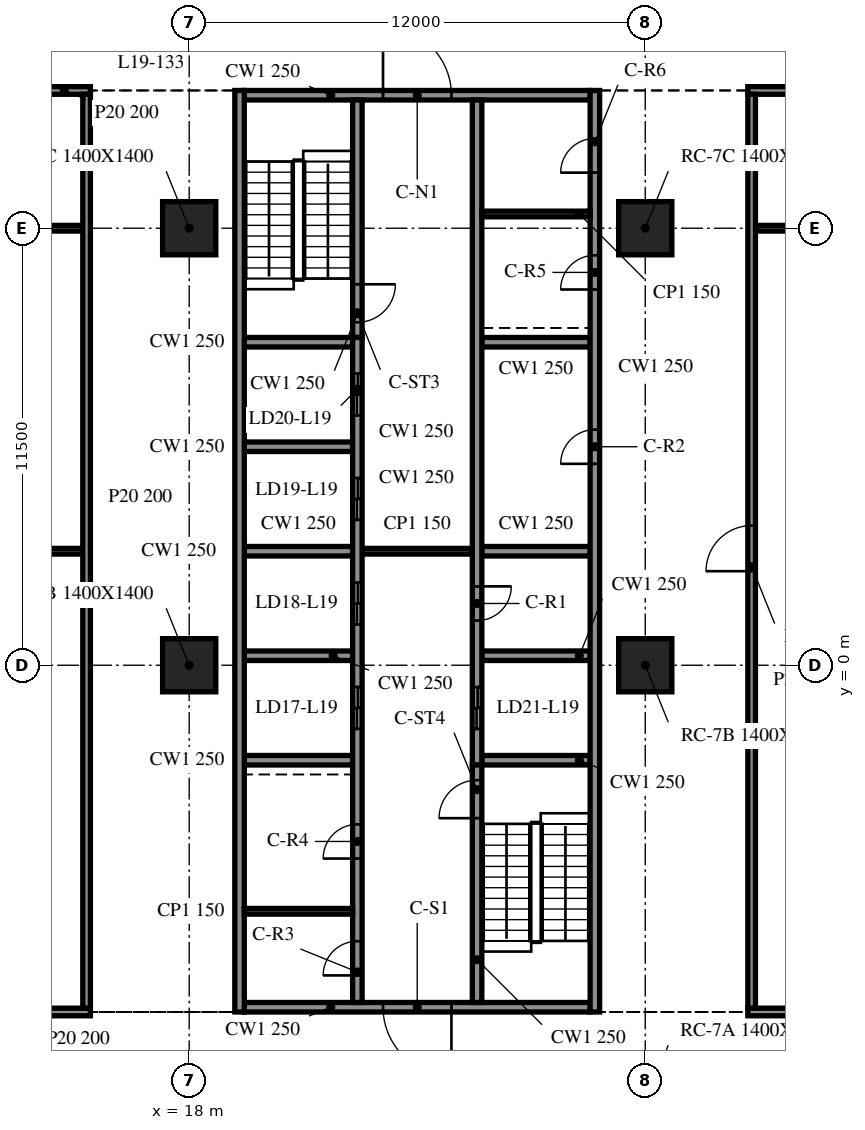
"""IFC4 building model, lengths in metres.
Left out: names, types, materials, properties, quantities, classifications, styles, units other than length and angle.
Written with IfcOpenShell. Run it as: python <this file> out.ifc"""

import sys

from ifc_helpers import new_model, si_unit, direction, frame, frame_2d, origin, origin_2d, place, context, subcontext, project, spatial, rectangle, extrude, element, fill, save


model = new_model("IFC4")
c1 = context("Model", 3, precision=1e-05, world=origin(), true_north=direction((0.0, 1.0)))
c2 = subcontext(c1, "Body", "Model", "MODEL_VIEW")
j1 = project(units=[si_unit("LENGTHUNIT", "METRE"), si_unit("PLANEANGLEUNIT", "RADIAN")], contexts=[c1])
p1 = place(None, origin())
s1 = spatial("IfcSite", under=j1, at=p1, CompositionType="ELEMENT")
p2 = place(p1, origin())
s2 = spatial("IfcBuilding", under=s1, at=p2, CompositionType="ELEMENT")
p3 = place(p2, frame((0.0, 0.0, 84.8)))
s3 = spatial("IfcBuildingStorey", under=s2, at=p3, CompositionType="ELEMENT", Elevation=84.8)
for number, where, z_axis, x_axis in (
    (1, (18.0, 0.0, -0.34), (0.0, 0.0, 1.0), (1.0, 0.0, 0.0)),
    (2, (18.0, 11.5, -0.34), (0.0, 0.0, 1.0), (1.0, 0.0, 0.0)),
    (3, (30.0, 0.0, -0.34), (0.0, 0.0, 1.0), (1.0, 0.0, 0.0)),
    (4, (30.0, 11.5, -0.34), (0.0, 0.0, 1.0), (1.0, 0.0, 0.0)),
):
    element("IfcColumn", number, at=place(p3, frame(where, z_axis=z_axis, x_axis=x_axis)), inside=s3, PredefinedType="COLUMN", context=c2, shape_type="SweptSolid", body=[
        extrude(rectangle(XDim=1.4, YDim=1.4, at=origin_2d()), origin(), (0.0, 0.0, 1.0), 4.1),
    ])
p4 = place(p3, frame((19.325, 15.125, 0.0), z_axis=(0.0, 0.0, 1.0), x_axis=(0.0, -1.0, 0.0)))
e5 = element("IfcWall", 5, at=p4, inside=s3, PredefinedType="SOLIDWALL", context=c2, shape_type="SweptSolid", body=[
    extrude(rectangle(XDim=24.25, YDim=0.25, at=frame_2d((12.125, 0.0))), origin(), (0.0, 0.0, 1.0), 3.76),
])
p5 = place(p3, frame((28.675, -9.125, 0.0), z_axis=(0.0, 0.0, 1.0), x_axis=(0.0, 1.0, 0.0)))
e6 = element("IfcWall", 6, at=p5, inside=s3, PredefinedType="SOLIDWALL", context=c2, shape_type="SweptSolid", body=[
    extrude(rectangle(XDim=24.25, YDim=0.25, at=frame_2d((12.125, 0.0))), origin(), (0.0, 0.0, 1.0), 3.76),
])
p6 = place(p5, frame((14.425, 0.0, 0.0)))
e7 = element("IfcOpeningElement", 7, at=p6, cuts=e6, PredefinedType="OPENING", context=c2, shape_type="SweptSolid", body=[
    extrude(rectangle(XDim=0.9, YDim=2.1, at=frame_2d((0.45, 1.05))), frame((0.0, 0.135, 0.0), z_axis=(0.0, -1.0, 0.0), x_axis=(1.0, 0.0, 0.0)), (0.0, 0.0, 1.0), 0.27),
])
p7 = place(p5, frame((19.012, 0.0, 0.0)))
e8 = element("IfcOpeningElement", 8, at=p7, cuts=e6, PredefinedType="OPENING", context=c2, shape_type="SweptSolid", body=[
    extrude(rectangle(XDim=0.9, YDim=2.1, at=frame_2d((0.45, 1.05))), frame((0.0, 0.135, 0.0), z_axis=(0.0, -1.0, 0.0), x_axis=(1.0, 0.0, 0.0)), (0.0, 0.0, 1.0), 0.27),
])
p8 = place(p5, frame((22.087, 0.0, 0.0)))
e9 = element("IfcOpeningElement", 9, at=p8, cuts=e6, PredefinedType="OPENING", context=c2, shape_type="SweptSolid", body=[
    extrude(rectangle(XDim=0.9, YDim=2.1, at=frame_2d((0.45, 1.05))), frame((0.0, 0.135, 0.0), z_axis=(0.0, -1.0, 0.0), x_axis=(1.0, 0.0, 0.0)), (0.0, 0.0, 1.0), 0.27),
])
p9 = place(p3, frame((28.55, -9.0, 0.0), z_axis=(0.0, 0.0, 1.0), x_axis=(-1.0, 0.0, 0.0)))
e10 = element("IfcWall", 10, at=p9, inside=s3, PredefinedType="SOLIDWALL", context=c2, shape_type="SweptSolid", body=[
    extrude(rectangle(XDim=9.1, YDim=0.25, at=frame_2d((4.55, 0.0))), origin(), (0.0, 0.0, 1.0), 3.76),
])
p10 = place(p9, frame((3.65, 0.0, 0.0)))
e11 = element("IfcOpeningElement", 11, at=p10, cuts=e10, PredefinedType="OPENING", context=c2, shape_type="SweptSolid", body=[
    extrude(rectangle(XDim=1.8, YDim=2.1, at=frame_2d((0.9, 1.05))), frame((0.0, 0.135, 0.0), z_axis=(0.0, -1.0, 0.0), x_axis=(1.0, 0.0, 0.0)), (0.0, 0.0, 1.0), 0.27),
])
p11 = place(p3, frame((19.45, 15.0, 0.0), z_axis=(0.0, 0.0, 1.0), x_axis=(1.0, 0.0, 0.0)))
e12 = element("IfcWall", 12, at=p11, inside=s3, PredefinedType="SOLIDWALL", context=c2, shape_type="SweptSolid", body=[
    extrude(rectangle(XDim=9.1, YDim=0.25, at=frame_2d((4.55, 0.0))), origin(), (0.0, 0.0, 1.0), 3.76),
])
p12 = place(p11, frame((3.65, 0.0, 0.0)))
e13 = element("IfcOpeningElement", 13, at=p12, cuts=e12, PredefinedType="OPENING", context=c2, shape_type="SweptSolid", body=[
    extrude(rectangle(XDim=1.8, YDim=2.1, at=frame_2d((0.9, 1.05))), frame((0.0, 0.135, 0.0), z_axis=(0.0, -1.0, 0.0), x_axis=(1.0, 0.0, 0.0)), (0.0, 0.0, 1.0), 0.27),
])
p13 = place(p3, frame((22.425, -8.875, 0.0), z_axis=(0.0, 0.0, 1.0), x_axis=(0.0, 1.0, 0.0)))
e14 = element("IfcWall", 14, at=p13, inside=s3, PredefinedType="SOLIDWALL", context=c2, shape_type="SweptSolid", body=[
    extrude(rectangle(XDim=17.5, YDim=0.25, at=frame_2d((8.75, 0.0))), origin(), (0.0, 0.0, 1.0), 3.76),
])
p14 = place(p13, frame((7.2, 0.0, 0.0)))
e15 = element("IfcOpeningElement", 15, at=p14, cuts=e14, PredefinedType="OPENING", context=c2, shape_type="SweptSolid", body=[
    extrude(rectangle(XDim=1.1, YDim=2.1, at=frame_2d((0.55, 1.05))), frame((0.0, 0.135, 0.0), z_axis=(0.0, -1.0, 0.0), x_axis=(1.0, 0.0, 0.0)), (0.0, 0.0, 1.0), 0.27),
])
p15 = place(p13, frame((9.95, 0.0, 0.0)))
e16 = element("IfcOpeningElement", 16, at=p15, cuts=e14, PredefinedType="OPENING", context=c2, shape_type="SweptSolid", body=[
    extrude(rectangle(XDim=1.1, YDim=2.1, at=frame_2d((0.55, 1.05))), frame((0.0, 0.135, 0.0), z_axis=(0.0, -1.0, 0.0), x_axis=(1.0, 0.0, 0.0)), (0.0, 0.0, 1.0), 0.27),
])
p16 = place(p13, frame((12.7, 0.0, 0.0)))
e17 = element("IfcOpeningElement", 17, at=p16, cuts=e14, PredefinedType="OPENING", context=c2, shape_type="SweptSolid", body=[
    extrude(rectangle(XDim=1.1, YDim=2.1, at=frame_2d((0.55, 1.05))), frame((0.0, 0.135, 0.0), z_axis=(0.0, -1.0, 0.0), x_axis=(1.0, 0.0, 0.0)), (0.0, 0.0, 1.0), 0.27),
])
p17 = place(p13, frame((15.45, 0.0, 0.0)))
e18 = element("IfcOpeningElement", 18, at=p17, cuts=e14, PredefinedType="OPENING", context=c2, shape_type="SweptSolid", body=[
    extrude(rectangle(XDim=1.1, YDim=2.1, at=frame_2d((0.55, 1.05))), frame((0.0, 0.135, 0.0), z_axis=(0.0, -1.0, 0.0), x_axis=(1.0, 0.0, 0.0)), (0.0, 0.0, 1.0), 0.27),
])
p18 = place(p13, frame((0.712, 0.0, 0.0)))
e19 = element("IfcOpeningElement", 19, at=p18, cuts=e14, PredefinedType="OPENING", context=c2, shape_type="SweptSolid", body=[
    extrude(rectangle(XDim=0.9, YDim=2.1, at=frame_2d((0.45, 1.05))), frame((0.0, 0.135, 0.0), z_axis=(0.0, -1.0, 0.0), x_axis=(1.0, 0.0, 0.0)), (0.0, 0.0, 1.0), 0.27),
])
p19 = place(p13, frame((3.788, 0.0, 0.0)))
e20 = element("IfcOpeningElement", 20, at=p19, cuts=e14, PredefinedType="OPENING", context=c2, shape_type="SweptSolid", body=[
    extrude(rectangle(XDim=0.9, YDim=2.1, at=frame_2d((0.45, 1.05))), frame((0.0, 0.135, 0.0), z_axis=(0.0, -1.0, 0.0), x_axis=(1.0, 0.0, 0.0)), (0.0, 0.0, 1.0), 0.27),
])
p20 = place(p3, frame((22.425, 14.875, 0.0), z_axis=(0.0, 0.0, 1.0), x_axis=(0.0, -1.0, 0.0)))
e21 = element("IfcWall", 21, at=p20, inside=s3, PredefinedType="SOLIDWALL", context=c2, shape_type="SweptSolid", body=[
    extrude(rectangle(XDim=6.25, YDim=0.25, at=frame_2d((3.125, 0.0))), origin(), (0.0, 0.0, 1.0), 3.76),
])
p21 = place(p20, frame((4.85, 0.0, 0.0)))
e22 = element("IfcOpeningElement", 22, at=p21, cuts=e21, PredefinedType="OPENING", context=c2, shape_type="SweptSolid", body=[
    extrude(rectangle(XDim=1.0, YDim=2.1, at=frame_2d((0.5, 1.05))), frame((0.0, 0.135, 0.0), z_axis=(0.0, -1.0, 0.0), x_axis=(1.0, 0.0, 0.0)), (0.0, 0.0, 1.0), 0.27),
])
p22 = place(p3, frame((25.575, -8.875, 0.0), z_axis=(0.0, 0.0, 1.0), x_axis=(0.0, 1.0, 0.0)))
e23 = element("IfcWall", 23, at=p22, inside=s3, PredefinedType="SOLIDWALL", context=c2, shape_type="SweptSolid", body=[
    extrude(rectangle(XDim=6.25, YDim=0.25, at=frame_2d((3.125, 0.0))), origin(), (0.0, 0.0, 1.0), 3.76),
])
p23 = place(p22, frame((4.85, 0.0, 0.0)))
e24 = element("IfcOpeningElement", 24, at=p23, cuts=e23, PredefinedType="OPENING", context=c2, shape_type="SweptSolid", body=[
    extrude(rectangle(XDim=1.0, YDim=2.1, at=frame_2d((0.5, 1.05))), frame((0.0, 0.135, 0.0), z_axis=(0.0, -1.0, 0.0), x_axis=(1.0, 0.0, 0.0)), (0.0, 0.0, 1.0), 0.27),
])
p24 = place(p3, frame((25.575, 14.875, 0.0), z_axis=(0.0, 0.0, 1.0), x_axis=(0.0, -1.0, 0.0)))
e25 = element("IfcWall", 25, at=p24, inside=s3, PredefinedType="SOLIDWALL", context=c2, shape_type="SweptSolid", body=[
    extrude(rectangle(XDim=17.5, YDim=0.25, at=frame_2d((8.75, 0.0))), origin(), (0.0, 0.0, 1.0), 3.76),
])
p25 = place(p24, frame((15.45, 0.0, 0.0)))
e26 = element("IfcOpeningElement", 26, at=p25, cuts=e25, PredefinedType="OPENING", context=c2, shape_type="SweptSolid", body=[
    extrude(rectangle(XDim=1.1, YDim=2.1, at=frame_2d((0.55, 1.05))), frame((0.0, 0.135, 0.0), z_axis=(0.0, -1.0, 0.0), x_axis=(1.0, 0.0, 0.0)), (0.0, 0.0, 1.0), 0.27),
])
p26 = place(p24, frame((12.8, 0.0, 0.0)))
e27 = element("IfcOpeningElement", 27, at=p26, cuts=e25, PredefinedType="OPENING", context=c2, shape_type="SweptSolid", body=[
    extrude(rectangle(XDim=0.9, YDim=2.1, at=frame_2d((0.45, 1.05))), frame((0.0, 0.135, 0.0), z_axis=(0.0, -1.0, 0.0), x_axis=(1.0, 0.0, 0.0)), (0.0, 0.0, 1.0), 0.27),
])
for number, where, z_axis, x_axis in (
    (28, (19.45, -2.5, 0.0), (0.0, 0.0, 1.0), (1.0, 0.0, 0.0)),
    (29, (19.45, 0.25, 0.0), (0.0, 0.0, 1.0), (1.0, 0.0, 0.0)),
    (30, (19.45, 3.0, 0.0), (0.0, 0.0, 1.0), (1.0, 0.0, 0.0)),
    (31, (19.45, 5.75, 0.0), (0.0, 0.0, 1.0), (1.0, 0.0, 0.0)),
    (32, (19.45, 8.5, 0.0), (0.0, 0.0, 1.0), (1.0, 0.0, 0.0)),
    (33, (25.7, -2.5, 0.0), (0.0, 0.0, 1.0), (1.0, 0.0, 0.0)),
    (34, (25.7, 0.25, 0.0), (0.0, 0.0, 1.0), (1.0, 0.0, 0.0)),
    (35, (25.7, 3.0, 0.0), (0.0, 0.0, 1.0), (1.0, 0.0, 0.0)),
    (36, (25.7, 8.5, 0.0), (0.0, 0.0, 1.0), (1.0, 0.0, 0.0)),
):
    element("IfcWall", number, at=place(p3, frame(where, z_axis=z_axis, x_axis=x_axis)), inside=s3, PredefinedType="SOLIDWALL", context=c2, shape_type="SweptSolid", body=[
        extrude(rectangle(XDim=2.85, YDim=0.25, at=frame_2d((1.425, 0.0))), origin(), (0.0, 0.0, 1.0), 3.76),
    ])
p27 = place(p3, frame((22.55, 3.0, 0.0), z_axis=(0.0, 0.0, 1.0), x_axis=(1.0, 0.0, 0.0)))
e37 = element("IfcWall", 37, at=p27, inside=s3, PredefinedType="PARTITIONING", context=c2, shape_type="SweptSolid", body=[
    extrude(rectangle(XDim=2.9, YDim=0.15, at=frame_2d((1.45, 0.0))), origin(), (0.0, 0.0, 1.0), 3.76),
])
for number, where, z_axis, x_axis in (
    (38, (19.45, -6.475, 0.0), (0.0, 0.0, 1.0), (1.0, 0.0, 0.0)),
    (39, (25.7, 11.875, 0.0), (0.0, 0.0, 1.0), (1.0, 0.0, 0.0)),
):
    element("IfcWall", number, at=place(p3, frame(where, z_axis=z_axis, x_axis=x_axis)), inside=s3, PredefinedType="PARTITIONING", context=c2, shape_type="SweptSolid", body=[
        extrude(rectangle(XDim=2.85, YDim=0.15, at=frame_2d((1.425, 0.0))), origin(), (0.0, 0.0, 1.0), 3.76),
    ])
p28 = place(p3, frame((8.5, -9.125, 0.0), z_axis=(0.0, 0.0, 1.0), x_axis=(1.0, 0.0, 0.0)))
e40 = element("IfcWall", 40, at=p28, inside=s3, PredefinedType="PARTITIONING", context=c2, shape_type="SweptSolid", body=[
    extrude(rectangle(XDim=6.9, YDim=0.2, at=frame_2d((3.45, 0.0))), origin(), (0.0, 0.0, 1.0), 3.76),
])
p29 = place(p28, frame((2.9, 0.0, 0.0)))
e41 = element("IfcOpeningElement", 41, at=p29, cuts=e40, PredefinedType="OPENING", context=c2, shape_type="SweptSolid", body=[
    extrude(rectangle(XDim=0.9, YDim=2.1, at=frame_2d((0.45, 1.05))), frame((0.0, 0.11, 0.0), z_axis=(0.0, -1.0, 0.0), x_axis=(1.0, 0.0, 0.0)), (0.0, 0.0, 1.0), 0.22),
])
p30 = place(p3, frame((32.7, -9.125, 0.0), z_axis=(0.0, 0.0, 1.0), x_axis=(1.0, 0.0, 0.0)))
e42 = element("IfcWall", 42, at=p30, inside=s3, PredefinedType="PARTITIONING", context=c2, shape_type="SweptSolid", body=[
    extrude(rectangle(XDim=19.25, YDim=0.2, at=frame_2d((9.625, 0.0))), origin(), (0.0, 0.0, 1.0), 3.76),
])
p31 = place(p30, frame((9.1, 0.0, 0.0)))
e43 = element("IfcOpeningElement", 43, at=p31, cuts=e42, PredefinedType="OPENING", context=c2, shape_type="SweptSolid", body=[
    extrude(rectangle(XDim=1.2, YDim=2.1, at=frame_2d((0.6, 1.05))), frame((0.0, 0.11, 0.0), z_axis=(0.0, -1.0, 0.0), x_axis=(1.0, 0.0, 0.0)), (0.0, 0.0, 1.0), 0.22),
])
for number, where, z_axis, x_axis in (
    (44, (8.7, 3.0, 0.0), (0.0, 0.0, 1.0), (1.0, 0.0, 0.0)),
    (45, (8.7, 11.5, 0.0), (0.0, 0.0, 1.0), (1.0, 0.0, 0.0)),
):
    element("IfcWall", number, at=place(p3, frame(where, z_axis=z_axis, x_axis=x_axis)), inside=s3, PredefinedType="PARTITIONING", context=c2, shape_type="SweptSolid", body=[
        extrude(rectangle(XDim=6.5, YDim=0.15, at=frame_2d((3.25, 0.0))), origin(), (0.0, 0.0, 1.0), 3.76),
    ])
p32 = place(p3, frame((32.9, 11.5, 0.0), z_axis=(0.0, 0.0, 1.0), x_axis=(1.0, 0.0, 0.0)))
e46 = element("IfcWall", 46, at=p32, inside=s3, PredefinedType="PARTITIONING", context=c2, shape_type="SweptSolid", body=[
    extrude(rectangle(XDim=8.4, YDim=0.15, at=frame_2d((4.2, 0.0))), origin(), (0.0, 0.0, 1.0), 3.76),
])
p33 = place(p3, frame((8.5, 15.125, 0.0), z_axis=(0.0, 0.0, 1.0), x_axis=(1.0, 0.0, 0.0)))
e47 = element("IfcWall", 47, at=p33, inside=s3, PredefinedType="PARTITIONING", context=c2, shape_type="SweptSolid", body=[
    extrude(rectangle(XDim=6.9, YDim=0.2, at=frame_2d((3.45, 0.0))), origin(), (0.0, 0.0, 1.0), 3.76),
])
p34 = place(p33, frame((2.9, 0.0, 0.0)))
e48 = element("IfcOpeningElement", 48, at=p34, cuts=e47, PredefinedType="OPENING", context=c2, shape_type="SweptSolid", body=[
    extrude(rectangle(XDim=1.0, YDim=2.1, at=frame_2d((0.5, 1.05))), frame((0.0, 0.11, 0.0), z_axis=(0.0, -1.0, 0.0), x_axis=(1.0, 0.0, 0.0)), (0.0, 0.0, 1.0), 0.22),
])
p35 = place(p3, frame((32.7, 15.125, 0.0), z_axis=(0.0, 0.0, 1.0), x_axis=(1.0, 0.0, 0.0)))
e49 = element("IfcWall", 49, at=p35, inside=s3, PredefinedType="PARTITIONING", context=c2, shape_type="SweptSolid", body=[
    extrude(rectangle(XDim=19.25, YDim=0.2, at=frame_2d((9.625, 0.0))), origin(), (0.0, 0.0, 1.0), 3.76),
])
p36 = place(p35, frame((4.9, 0.0, 0.0)))
e50 = element("IfcOpeningElement", 50, at=p36, cuts=e49, PredefinedType="OPENING", context=c2, shape_type="SweptSolid", body=[
    extrude(rectangle(XDim=1.2, YDim=2.1, at=frame_2d((0.6, 1.05))), frame((0.0, 0.11, 0.0), z_axis=(0.0, -1.0, 0.0), x_axis=(1.0, 0.0, 0.0)), (0.0, 0.0, 1.0), 0.22),
])
p37 = place(p35, frame((9.1, 0.0, 0.0)))
e51 = element("IfcOpeningElement", 51, at=p37, cuts=e49, PredefinedType="OPENING", context=c2, shape_type="SweptSolid", body=[
    extrude(rectangle(XDim=1.2, YDim=2.1, at=frame_2d((0.6, 1.05))), frame((0.0, 0.11, 0.0), z_axis=(0.0, -1.0, 0.0), x_axis=(1.0, 0.0, 0.0)), (0.0, 0.0, 1.0), 0.22),
])
p38 = place(p3, frame((15.3, -9.025, 0.0), z_axis=(0.0, 0.0, 1.0), x_axis=(0.0, 1.0, 0.0)))
e52 = element("IfcWall", 52, at=p38, inside=s3, PredefinedType="PARTITIONING", context=c2, shape_type="SweptSolid", body=[
    extrude(rectangle(XDim=24.05, YDim=0.2, at=frame_2d((12.025, 0.0))), origin(), (0.0, 0.0, 1.0), 3.76),
])
p39 = place(p3, frame((32.8, -9.025, 0.0), z_axis=(0.0, 0.0, 1.0), x_axis=(0.0, 1.0, 0.0)))
e53 = element("IfcWall", 53, at=p39, inside=s3, PredefinedType="PARTITIONING", context=c2, shape_type="SweptSolid", body=[
    extrude(rectangle(XDim=24.05, YDim=0.2, at=frame_2d((12.025, 0.0))), origin(), (0.0, 0.0, 1.0), 3.76),
])
p40 = place(p39, frame((11.5, 0.0, 0.0)))
e54 = element("IfcOpeningElement", 54, at=p40, cuts=e53, PredefinedType="OPENING", context=c2, shape_type="SweptSolid", body=[
    extrude(rectangle(XDim=1.2, YDim=2.1, at=frame_2d((0.6, 1.05))), frame((0.0, 0.11, 0.0), z_axis=(0.0, -1.0, 0.0), x_axis=(1.0, 0.0, 0.0)), (0.0, 0.0, 1.0), 0.22),
])
p41 = place(p10, origin())
e55 = element("IfcDoor", 55, at=p41, inside=s3, OperationType="DOUBLE_DOOR_SINGLE_SWING", PredefinedType="DOOR", context=c2, shape_type="SweptSolid", body=[
    extrude(rectangle(XDim=1.8, YDim=2.1, at=frame_2d((0.9, 1.05))), frame((0.0, 0.025, 0.0), z_axis=(0.0, -1.0, 0.0), x_axis=(1.0, 0.0, 0.0)), (0.0, 0.0, 1.0), 0.05),
])
fill(e11, e55)
p42 = place(p12, origin())
e56 = element("IfcDoor", 56, at=p42, inside=s3, OperationType="DOUBLE_DOOR_SINGLE_SWING", PredefinedType="DOOR", context=c2, shape_type="SweptSolid", body=[
    extrude(rectangle(XDim=1.8, YDim=2.1, at=frame_2d((0.9, 1.05))), frame((0.0, 0.025, 0.0), z_axis=(0.0, -1.0, 0.0), x_axis=(1.0, 0.0, 0.0)), (0.0, 0.0, 1.0), 0.05),
])
fill(e13, e56)
p43 = place(p25, origin())
e57 = element("IfcDoor", 57, at=p43, inside=s3, OperationType="DOUBLE_DOOR_SLIDING", PredefinedType="DOOR", context=c2, shape_type="SweptSolid", body=[
    extrude(rectangle(XDim=1.1, YDim=2.1, at=frame_2d((0.55, 1.05))), frame((0.0, 0.025, 0.0), z_axis=(0.0, -1.0, 0.0), x_axis=(1.0, 0.0, 0.0)), (0.0, 0.0, 1.0), 0.05),
])
fill(e26, e57)
p44 = place(p14, origin())
e58 = element("IfcDoor", 58, at=p44, inside=s3, OperationType="DOUBLE_DOOR_SLIDING", PredefinedType="DOOR", context=c2, shape_type="SweptSolid", body=[
    extrude(rectangle(XDim=1.1, YDim=2.1, at=frame_2d((0.55, 1.05))), frame((0.0, 0.025, 0.0), z_axis=(0.0, -1.0, 0.0), x_axis=(1.0, 0.0, 0.0)), (0.0, 0.0, 1.0), 0.05),
])
fill(e15, e58)
p45 = place(p15, origin())
e59 = element("IfcDoor", 59, at=p45, inside=s3, OperationType="DOUBLE_DOOR_SLIDING", PredefinedType="DOOR", context=c2, shape_type="SweptSolid", body=[
    extrude(rectangle(XDim=1.1, YDim=2.1, at=frame_2d((0.55, 1.05))), frame((0.0, 0.025, 0.0), z_axis=(0.0, -1.0, 0.0), x_axis=(1.0, 0.0, 0.0)), (0.0, 0.0, 1.0), 0.05),
])
fill(e16, e59)
p46 = place(p16, origin())
e60 = element("IfcDoor", 60, at=p46, inside=s3, OperationType="DOUBLE_DOOR_SLIDING", PredefinedType="DOOR", context=c2, shape_type="SweptSolid", body=[
    extrude(rectangle(XDim=1.1, YDim=2.1, at=frame_2d((0.55, 1.05))), frame((0.0, 0.025, 0.0), z_axis=(0.0, -1.0, 0.0), x_axis=(1.0, 0.0, 0.0)), (0.0, 0.0, 1.0), 0.05),
])
fill(e17, e60)
p47 = place(p17, origin())
e61 = element("IfcDoor", 61, at=p47, inside=s3, OperationType="DOUBLE_DOOR_SLIDING", PredefinedType="DOOR", context=c2, shape_type="SweptSolid", body=[
    extrude(rectangle(XDim=1.1, YDim=2.1, at=frame_2d((0.55, 1.05))), frame((0.0, 0.025, 0.0), z_axis=(0.0, -1.0, 0.0), x_axis=(1.0, 0.0, 0.0)), (0.0, 0.0, 1.0), 0.05),
])
fill(e18, e61)
p48 = place(p26, origin())
e62 = element("IfcDoor", 62, at=p48, inside=s3, OperationType="SINGLE_SWING_LEFT", PredefinedType="DOOR", context=c2, shape_type="SweptSolid", body=[
    extrude(rectangle(XDim=0.9, YDim=2.1, at=frame_2d((0.45, 1.05))), frame((0.0, 0.025, 0.0), z_axis=(0.0, -1.0, 0.0), x_axis=(1.0, 0.0, 0.0)), (0.0, 0.0, 1.0), 0.05),
])
fill(e27, e62)
p49 = place(p6, origin())
e63 = element("IfcDoor", 63, at=p49, inside=s3, OperationType="SINGLE_SWING_RIGHT", PredefinedType="DOOR", context=c2, shape_type="SweptSolid", body=[
    extrude(rectangle(XDim=0.9, YDim=2.1, at=frame_2d((0.45, 1.05))), frame((0.0, 0.025, 0.0), z_axis=(0.0, -1.0, 0.0), x_axis=(1.0, 0.0, 0.0)), (0.0, 0.0, 1.0), 0.05),
])
fill(e7, e63)
p50 = place(p18, origin())
e64 = element("IfcDoor", 64, at=p50, inside=s3, OperationType="SINGLE_SWING_LEFT", PredefinedType="DOOR", context=c2, shape_type="SweptSolid", body=[
    extrude(rectangle(XDim=0.9, YDim=2.1, at=frame_2d((0.45, 1.05))), frame((0.0, 0.025, 0.0), z_axis=(0.0, -1.0, 0.0), x_axis=(1.0, 0.0, 0.0)), (0.0, 0.0, 1.0), 0.05),
])
fill(e19, e64)
p51 = place(p19, origin())
e65 = element("IfcDoor", 65, at=p51, inside=s3, OperationType="SINGLE_SWING_RIGHT", PredefinedType="DOOR", context=c2, shape_type="SweptSolid", body=[
    extrude(rectangle(XDim=0.9, YDim=2.1, at=frame_2d((0.45, 1.05))), frame((0.0, 0.025, 0.0), z_axis=(0.0, -1.0, 0.0), x_axis=(1.0, 0.0, 0.0)), (0.0, 0.0, 1.0), 0.05),
])
fill(e20, e65)
p52 = place(p7, origin())
e66 = element("IfcDoor", 66, at=p52, inside=s3, OperationType="SINGLE_SWING_LEFT", PredefinedType="DOOR", context=c2, shape_type="SweptSolid", body=[
    extrude(rectangle(XDim=0.9, YDim=2.1, at=frame_2d((0.45, 1.05))), frame((0.0, 0.025, 0.0), z_axis=(0.0, -1.0, 0.0), x_axis=(1.0, 0.0, 0.0)), (0.0, 0.0, 1.0), 0.05),
])
fill(e8, e66)
p53 = place(p8, origin())
e67 = element("IfcDoor", 67, at=p53, inside=s3, OperationType="SINGLE_SWING_RIGHT", PredefinedType="DOOR", context=c2, shape_type="SweptSolid", body=[
    extrude(rectangle(XDim=0.9, YDim=2.1, at=frame_2d((0.45, 1.05))), frame((0.0, 0.025, 0.0), z_axis=(0.0, -1.0, 0.0), x_axis=(1.0, 0.0, 0.0)), (0.0, 0.0, 1.0), 0.05),
])
fill(e9, e67)
p54 = place(p21, origin())
e68 = element("IfcDoor", 68, at=p54, inside=s3, OperationType="SINGLE_SWING_LEFT", PredefinedType="DOOR", context=c2, shape_type="SweptSolid", body=[
    extrude(rectangle(XDim=1.0, YDim=2.1, at=frame_2d((0.5, 1.05))), frame((0.0, 0.025, 0.0), z_axis=(0.0, -1.0, 0.0), x_axis=(1.0, 0.0, 0.0)), (0.0, 0.0, 1.0), 0.05),
])
fill(e22, e68)
p55 = place(p23, origin())
e69 = element("IfcDoor", 69, at=p55, inside=s3, OperationType="SINGLE_SWING_RIGHT", PredefinedType="DOOR", context=c2, shape_type="SweptSolid", body=[
    extrude(rectangle(XDim=1.0, YDim=2.1, at=frame_2d((0.5, 1.05))), frame((0.0, 0.025, 0.0), z_axis=(0.0, -1.0, 0.0), x_axis=(1.0, 0.0, 0.0)), (0.0, 0.0, 1.0), 0.05),
])
fill(e24, e69)
p56 = place(p40, origin())
e70 = element("IfcDoor", 70, at=p56, inside=s3, OperationType="SINGLE_SWING_LEFT", PredefinedType="DOOR", context=c2, shape_type="SweptSolid", body=[
    extrude(rectangle(XDim=1.2, YDim=2.1, at=frame_2d((0.6, 1.05))), frame((0.0, 0.025, 0.0), z_axis=(0.0, -1.0, 0.0), x_axis=(1.0, 0.0, 0.0)), (0.0, 0.0, 1.0), 0.05),
])
fill(e54, e70)
save(model, sys.argv[1])
